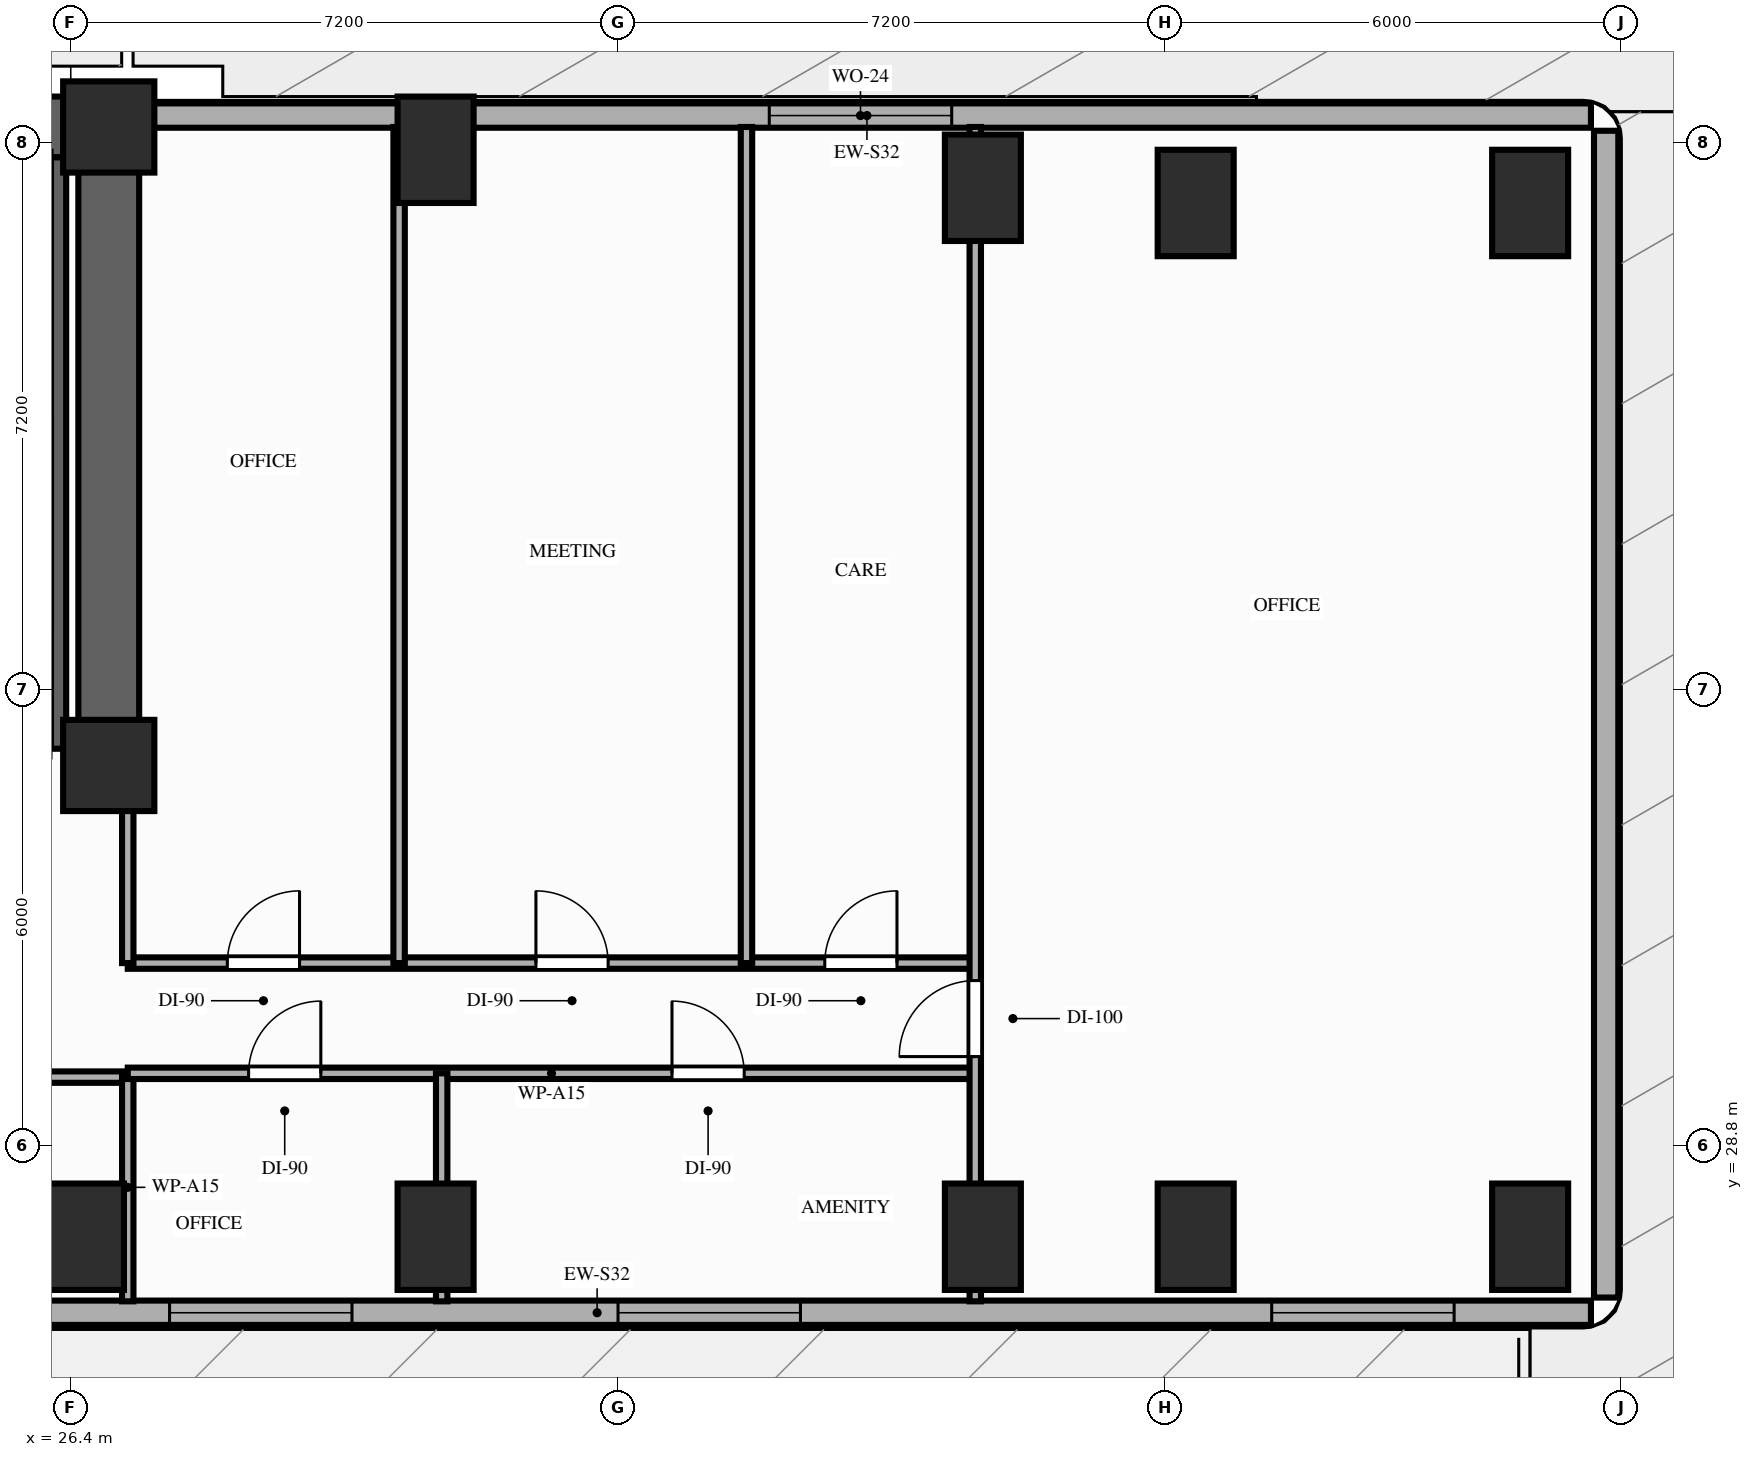
"""IFC4 building model, lengths in metres.
Left out: names, types, materials, properties, quantities, classifications, styles, units other than length and angle.
Written with IfcOpenShell. Run it as: python <this file> out.ifc"""

import sys

from ifc_helpers import new_model, si_unit, direction, frame, frame_2d, origin, origin_2d, place, context, subcontext, project, spatial, rectangle, extrude, element, fill, save


model = new_model("IFC4")
c1 = context("Model", 3, precision=1e-05, world=origin(), true_north=direction((0.0, 1.0)))
c2 = subcontext(c1, "Body", "Model", "MODEL_VIEW")
j1 = project(units=[si_unit("LENGTHUNIT", "METRE"), si_unit("PLANEANGLEUNIT", "RADIAN")], contexts=[c1])
p1 = place(None, origin())
s1 = spatial("IfcSite", under=j1, at=p1, CompositionType="ELEMENT")
p2 = place(p1, origin())
s2 = spatial("IfcBuilding", under=s1, at=p2, CompositionType="ELEMENT")
p3 = place(p2, frame((0.0, 0.0, 26.4)))
s3 = spatial("IfcBuildingStorey", under=s2, at=p3, CompositionType="ELEMENT", Elevation=26.4)
for number, where, z_axis, x_axis in (
    (1, (26.9, 33.8, 0.0), (0.0, 0.0, 1.0), (1.0, 0.0, 0.0)),
    (2, (26.9, 42.2, 0.0), (0.0, 0.0, 1.0), (1.0, 0.0, 0.0)),
):
    element("IfcColumn", number, at=place(p3, frame(where, z_axis=z_axis, x_axis=x_axis)), inside=s3, PredefinedType="COLUMN", context=c2, shape_type="SweptSolid", body=[
        extrude(rectangle(XDim=1.2, YDim=1.2, at=origin_2d()), origin(), (0.0, 0.0, 1.0), 3.8),
    ])
for number, where, z_axis, x_axis in (
    (3, (26.6, 27.6, -0.32), (0.0, 0.0, 1.0), (1.0, 0.0, 0.0)),
    (4, (31.2, 27.6, -0.32), (0.0, 0.0, 1.0), (1.0, 0.0, 0.0)),
    (5, (31.2, 41.9, -0.32), (0.0, 0.0, 1.0), (1.0, 0.0, 0.0)),
    (6, (38.4, 27.6, -0.32), (0.0, 0.0, 1.0), (1.0, 0.0, 0.0)),
    (7, (38.4, 41.4, -0.32), (0.0, 0.0, 1.0), (1.0, 0.0, 0.0)),
    (8, (41.2, 27.6, -0.32), (0.0, 0.0, 1.0), (1.0, 0.0, 0.0)),
    (9, (41.2, 41.2, -0.32), (0.0, 0.0, 1.0), (1.0, 0.0, 0.0)),
):
    element("IfcColumn", number, at=place(p3, frame(where, z_axis=z_axis, x_axis=x_axis)), inside=s3, PredefinedType="COLUMN", context=c2, shape_type="SweptSolid", body=[
        extrude(rectangle(XDim=1.0, YDim=1.4, at=origin_2d()), origin(), (0.0, 0.0, 1.0), 4.12),
    ])
for number, where, z_axis, x_axis in (
    (10, (45.6, 27.6, 0.0), (0.0, 0.0, 1.0), (1.0, 0.0, 0.0)),
    (11, (45.6, 41.2, 0.0), (0.0, 0.0, 1.0), (1.0, 0.0, 0.0)),
):
    element("IfcColumn", number, at=place(p3, frame(where, z_axis=z_axis, x_axis=x_axis)), inside=s3, PredefinedType="COLUMN", context=c2, shape_type="SweptSolid", body=[
        extrude(rectangle(XDim=1.0, YDim=1.4, at=origin_2d()), origin(), (0.0, 0.0, 1.0), 3.8),
    ])
p4 = place(p3, frame((46.4, 42.35, 0.0), z_axis=(0.0, 0.0, 1.0), x_axis=(-1.0, 0.0, 0.0)))
e12 = element("IfcWall", 12, at=p4, inside=s3, PredefinedType="STANDARD", context=c2, shape_type="SweptSolid", body=[
    extrude(rectangle(XDim=19.05, YDim=0.32, at=frame_2d((9.525, 0.0))), origin(), (0.0, 0.0, 1.0), 3.62),
])
p5 = place(p4, frame((8.41, 0.0, 0.85)))
e13 = element("IfcOpeningElement", 13, at=p5, cuts=e12, PredefinedType="OPENING", context=c2, shape_type="SweptSolid", body=[
    extrude(rectangle(XDim=2.4, YDim=1.8, at=frame_2d((1.2, 0.9))), frame((0.0, 0.17, 0.0), z_axis=(0.0, -1.0, 0.0), x_axis=(1.0, 0.0, 0.0)), (0.0, 0.0, 1.0), 0.34),
])
p6 = place(p3, frame((20.25, 26.6, 0.0), z_axis=(0.0, 0.0, 1.0), x_axis=(1.0, 0.0, 0.0)))
e14 = element("IfcWall", 14, at=p6, inside=s3, PredefinedType="STANDARD", context=c2, shape_type="SweptSolid", body=[
    extrude(rectangle(XDim=26.15, YDim=0.32, at=frame_2d((13.075, 0.0))), origin(), (0.0, 0.0, 1.0), 3.62),
])
p7 = place(p6, frame((1.95, 0.0, 0.85)))
e15 = element("IfcOpeningElement", 15, at=p7, cuts=e14, PredefinedType="OPENING", context=c2, shape_type="SweptSolid", body=[
    extrude(rectangle(XDim=2.4, YDim=1.8, at=frame_2d((1.2, 0.9))), frame((0.0, 0.17, 0.0), z_axis=(0.0, -1.0, 0.0), x_axis=(1.0, 0.0, 0.0)), (0.0, 0.0, 1.0), 0.34),
])
p8 = place(p6, frame((7.45, 0.0, 0.85)))
e16 = element("IfcOpeningElement", 16, at=p8, cuts=e14, PredefinedType="OPENING", context=c2, shape_type="SweptSolid", body=[
    extrude(rectangle(XDim=2.4, YDim=1.8, at=frame_2d((1.2, 0.9))), frame((0.0, 0.17, 0.0), z_axis=(0.0, -1.0, 0.0), x_axis=(1.0, 0.0, 0.0)), (0.0, 0.0, 1.0), 0.34),
])
p9 = place(p6, frame((13.35, 0.0, 0.85)))
e17 = element("IfcOpeningElement", 17, at=p9, cuts=e14, PredefinedType="OPENING", context=c2, shape_type="SweptSolid", body=[
    extrude(rectangle(XDim=2.4, YDim=1.8, at=frame_2d((1.2, 0.9))), frame((0.0, 0.17, 0.0), z_axis=(0.0, -1.0, 0.0), x_axis=(1.0, 0.0, 0.0)), (0.0, 0.0, 1.0), 0.34),
])
p10 = place(p6, frame((21.95, 0.0, 0.85)))
e18 = element("IfcOpeningElement", 18, at=p10, cuts=e14, PredefinedType="OPENING", context=c2, shape_type="SweptSolid", body=[
    extrude(rectangle(XDim=2.4, YDim=1.8, at=frame_2d((1.2, 0.9))), frame((0.0, 0.17, 0.0), z_axis=(0.0, -1.0, 0.0), x_axis=(1.0, 0.0, 0.0)), (0.0, 0.0, 1.0), 0.34),
])
p11 = place(p3, frame((46.6, 26.8, 0.0), z_axis=(0.0, 0.0, 1.0), x_axis=(0.0, 1.0, 0.0)))
e19 = element("IfcWall", 19, at=p11, inside=s3, PredefinedType="STANDARD", context=c2, shape_type="SweptSolid", body=[
    extrude(rectangle(XDim=15.35, YDim=0.32, at=frame_2d((7.675, 0.0))), origin(), (0.0, 0.0, 1.0), 3.62),
])
p12 = place(p3, frame((6.45, 42.2, 0.0), z_axis=(0.0, 0.0, 1.0), x_axis=(1.0, 0.0, 0.0)))
e20 = element("IfcWall", 20, at=p12, inside=s3, PredefinedType="SHEAR", context=c2, shape_type="SweptSolid", body=[
    extrude(rectangle(XDim=20.45, YDim=0.8, at=frame_2d((10.225, 0.0))), origin(), (0.0, 0.0, 1.0), 3.62),
])
p13 = place(p3, frame((26.9, 33.8, 0.0), z_axis=(0.0, 0.0, 1.0), x_axis=(0.0, 1.0, 0.0)))
e21 = element("IfcWall", 21, at=p13, inside=s3, PredefinedType="SHEAR", context=c2, shape_type="SweptSolid", body=[
    extrude(rectangle(XDim=7.95, YDim=0.8, at=frame_2d((3.975, 0.0))), origin(), (0.0, 0.0, 1.0), 3.62),
])
p14 = place(p3, frame((26.24, 34.02, 0.0), z_axis=(0.0, 0.0, 1.0), x_axis=(0.0, 1.0, 0.0)))
e22 = element("IfcWall", 22, at=p14, inside=s3, PredefinedType="SHEAR", context=c2, shape_type="SweptSolid", body=[
    extrude(rectangle(XDim=7.78, YDim=0.2, at=frame_2d((3.89, 0.0))), origin(), (0.0, 0.0, 1.0), 3.62),
])
p15 = place(p3, frame((20.45, 29.7, 0.0), z_axis=(0.0, 0.0, 1.0), x_axis=(1.0, 0.0, 0.0)))
e23 = element("IfcWall", 23, at=p15, inside=s3, PredefinedType="PARTITIONING", context=c2, shape_type="SweptSolid", body=[
    extrude(rectangle(XDim=6.7, YDim=0.15, at=frame_2d((3.35, 0.0))), origin(), (0.0, 0.0, 1.0), 3.0),
])
p16 = place(p15, frame((2.8, 0.0, 0.0)))
e24 = element("IfcOpeningElement", 24, at=p16, cuts=e23, PredefinedType="OPENING", context=c2, shape_type="SweptSolid", body=[
    extrude(rectangle(XDim=0.95, YDim=2.15, at=frame_2d((0.475, 1.075))), frame((0.0, 0.085, 0.0), z_axis=(0.0, -1.0, 0.0), x_axis=(1.0, 0.0, 0.0)), (0.0, 0.0, 1.0), 0.17),
])
p17 = place(p3, frame((27.15, 26.75, 0.0), z_axis=(0.0, 0.0, 1.0), x_axis=(0.0, 1.0, 0.0)))
e25 = element("IfcWall", 25, at=p17, inside=s3, PredefinedType="PARTITIONING", context=c2, shape_type="SweptSolid", body=[
    extrude(rectangle(XDim=3.0, YDim=0.15, at=frame_2d((1.5, 0.0))), origin(), (0.0, 0.0, 1.0), 3.62),
])
p18 = place(p3, frame((27.15, 29.75, 0.0), z_axis=(0.0, 0.0, 1.0), x_axis=(1.0, 0.0, 0.0)))
e26 = element("IfcWall", 26, at=p18, inside=s3, PredefinedType="PARTITIONING", context=c2, shape_type="SweptSolid", body=[
    extrude(rectangle(XDim=11.15, YDim=0.15, at=frame_2d((5.575, 0.0))), origin(), (0.0, 0.0, 1.0), 3.62),
])
p19 = place(p18, frame((1.59, 0.0, 0.0)))
e27 = element("IfcOpeningElement", 27, at=p19, cuts=e26, PredefinedType="OPENING", context=c2, shape_type="SweptSolid", body=[
    extrude(rectangle(XDim=0.95, YDim=2.15, at=frame_2d((0.475, 1.075))), frame((0.0, 0.085, 0.0), z_axis=(0.0, -1.0, 0.0), x_axis=(1.0, 0.0, 0.0)), (0.0, 0.0, 1.0), 0.17),
])
p20 = place(p18, frame((7.16, 0.0, 0.0)))
e28 = element("IfcOpeningElement", 28, at=p20, cuts=e26, PredefinedType="OPENING", context=c2, shape_type="SweptSolid", body=[
    extrude(rectangle(XDim=0.95, YDim=2.15, at=frame_2d((0.475, 1.075))), frame((0.0, 0.085, 0.0), z_axis=(0.0, -1.0, 0.0), x_axis=(1.0, 0.0, 0.0)), (0.0, 0.0, 1.0), 0.17),
])
p21 = place(p3, frame((27.15, 31.2, 0.0), z_axis=(0.0, 0.0, 1.0), x_axis=(1.0, 0.0, 0.0)))
e29 = element("IfcWall", 29, at=p21, inside=s3, PredefinedType="PARTITIONING", context=c2, shape_type="SweptSolid", body=[
    extrude(rectangle(XDim=11.15, YDim=0.15, at=frame_2d((5.575, 0.0))), origin(), (0.0, 0.0, 1.0), 3.0),
])
p22 = place(p21, frame((1.31, 0.0, 0.0)))
e30 = element("IfcOpeningElement", 30, at=p22, cuts=e29, PredefinedType="OPENING", context=c2, shape_type="SweptSolid", body=[
    extrude(rectangle(XDim=0.95, YDim=2.15, at=frame_2d((0.475, 1.075))), frame((0.0, 0.085, 0.0), z_axis=(0.0, -1.0, 0.0), x_axis=(1.0, 0.0, 0.0)), (0.0, 0.0, 1.0), 0.17),
])
p23 = place(p21, frame((5.37, 0.0, 0.0)))
e31 = element("IfcOpeningElement", 31, at=p23, cuts=e29, PredefinedType="OPENING", context=c2, shape_type="SweptSolid", body=[
    extrude(rectangle(XDim=0.95, YDim=2.15, at=frame_2d((0.475, 1.075))), frame((0.0, 0.085, 0.0), z_axis=(0.0, -1.0, 0.0), x_axis=(1.0, 0.0, 0.0)), (0.0, 0.0, 1.0), 0.17),
])
p24 = place(p21, frame((9.17, 0.0, 0.0)))
e32 = element("IfcOpeningElement", 32, at=p24, cuts=e29, PredefinedType="OPENING", context=c2, shape_type="SweptSolid", body=[
    extrude(rectangle(XDim=0.95, YDim=2.15, at=frame_2d((0.475, 1.075))), frame((0.0, 0.085, 0.0), z_axis=(0.0, -1.0, 0.0), x_axis=(1.0, 0.0, 0.0)), (0.0, 0.0, 1.0), 0.17),
])
p25 = place(p3, frame((27.15, 31.2, 0.0), z_axis=(0.0, 0.0, 1.0), x_axis=(0.0, 1.0, 0.0)))
e33 = element("IfcWall", 33, at=p25, inside=s3, PredefinedType="PARTITIONING", context=c2, shape_type="SweptSolid", body=[
    extrude(rectangle(XDim=2.48, YDim=0.15, at=frame_2d((1.24, 0.0))), origin(), (0.0, 0.0, 1.0), 3.0),
])
p26 = place(p3, frame((38.3, 26.75, 0.0), z_axis=(0.0, 0.0, 1.0), x_axis=(0.0, 1.0, 0.0)))
e34 = element("IfcWall", 34, at=p26, inside=s3, PredefinedType="PARTITIONING", context=c2, shape_type="SweptSolid", body=[
    extrude(rectangle(XDim=15.45, YDim=0.15, at=frame_2d((7.725, 0.0))), origin(), (0.0, 0.0, 1.0), 3.62),
])
p27 = place(p26, frame((3.22, 0.0, 0.0)))
e35 = element("IfcOpeningElement", 35, at=p27, cuts=e34, PredefinedType="OPENING", context=c2, shape_type="SweptSolid", body=[
    extrude(rectangle(XDim=1.0, YDim=2.15, at=frame_2d((0.5, 1.075))), frame((0.0, 0.085, 0.0), z_axis=(0.0, -1.0, 0.0), x_axis=(1.0, 0.0, 0.0)), (0.0, 0.0, 1.0), 0.17),
])
p28 = place(p3, frame((31.28, 26.75, 0.0), z_axis=(0.0, 0.0, 1.0), x_axis=(0.0, 1.0, 0.0)))
e36 = element("IfcWall", 36, at=p28, inside=s3, PredefinedType="PARTITIONING", context=c2, shape_type="SweptSolid", body=[
    extrude(rectangle(XDim=3.0, YDim=0.15, at=frame_2d((1.5, 0.0))), origin(), (0.0, 0.0, 1.0), 3.62),
])
for number, where, z_axis, x_axis in (
    (37, (30.72, 31.2, 0.0), (0.0, 0.0, 1.0), (0.0, 1.0, 0.0)),
    (38, (35.29, 31.2, 0.0), (0.0, 0.0, 1.0), (0.0, 1.0, 0.0)),
):
    element("IfcWall", number, at=place(p3, frame(where, z_axis=z_axis, x_axis=x_axis)), inside=s3, PredefinedType="PARTITIONING", context=c2, shape_type="SweptSolid", body=[
        extrude(rectangle(XDim=11.0, YDim=0.15, at=frame_2d((5.5, 0.0))), origin(), (0.0, 0.0, 1.0), 3.62),
    ])
p29 = place(p5, origin())
e39 = element("IfcWindow", 39, at=p29, inside=s3, PartitioningType="SINGLE_PANEL", PredefinedType="WINDOW", context=c2, shape_type="SweptSolid", body=[
    extrude(rectangle(XDim=2.4, YDim=1.8, at=frame_2d((1.2, 0.9))), frame((0.0, 0.03, 0.0), z_axis=(0.0, -1.0, 0.0), x_axis=(1.0, 0.0, 0.0)), (0.0, 0.0, 1.0), 0.06),
])
fill(e13, e39)
p30 = place(p8, origin())
e40 = element("IfcWindow", 40, at=p30, inside=s3, PartitioningType="SINGLE_PANEL", PredefinedType="WINDOW", context=c2, shape_type="SweptSolid", body=[
    extrude(rectangle(XDim=2.4, YDim=1.8, at=frame_2d((1.2, 0.9))), frame((0.0, 0.03, 0.0), z_axis=(0.0, -1.0, 0.0), x_axis=(1.0, 0.0, 0.0)), (0.0, 0.0, 1.0), 0.06),
])
fill(e16, e40)
p31 = place(p9, origin())
e41 = element("IfcWindow", 41, at=p31, inside=s3, PartitioningType="SINGLE_PANEL", PredefinedType="WINDOW", context=c2, shape_type="SweptSolid", body=[
    extrude(rectangle(XDim=2.4, YDim=1.8, at=frame_2d((1.2, 0.9))), frame((0.0, 0.03, 0.0), z_axis=(0.0, -1.0, 0.0), x_axis=(1.0, 0.0, 0.0)), (0.0, 0.0, 1.0), 0.06),
])
fill(e17, e41)
p32 = place(p10, origin())
e42 = element("IfcWindow", 42, at=p32, inside=s3, PartitioningType="SINGLE_PANEL", PredefinedType="WINDOW", context=c2, shape_type="SweptSolid", body=[
    extrude(rectangle(XDim=2.4, YDim=1.8, at=frame_2d((1.2, 0.9))), frame((0.0, 0.03, 0.0), z_axis=(0.0, -1.0, 0.0), x_axis=(1.0, 0.0, 0.0)), (0.0, 0.0, 1.0), 0.06),
])
fill(e18, e42)
p33 = place(p27, origin())
e43 = element("IfcDoor", 43, at=p33, inside=s3, OperationType="SINGLE_SWING_LEFT", PredefinedType="DOOR", context=c2, shape_type="SweptSolid", body=[
    extrude(rectangle(XDim=1.0, YDim=2.15, at=frame_2d((0.5, 1.075))), frame((0.0, 0.025, 0.0), z_axis=(0.0, -1.0, 0.0), x_axis=(1.0, 0.0, 0.0)), (0.0, 0.0, 1.0), 0.05),
])
fill(e35, e43)
p34 = place(p19, origin())
e44 = element("IfcDoor", 44, at=p34, inside=s3, OperationType="SINGLE_SWING_RIGHT", PredefinedType="DOOR", context=c2, shape_type="SweptSolid", body=[
    extrude(rectangle(XDim=0.95, YDim=2.15, at=frame_2d((0.475, 1.075))), frame((0.0, 0.025, 0.0), z_axis=(0.0, -1.0, 0.0), x_axis=(1.0, 0.0, 0.0)), (0.0, 0.0, 1.0), 0.05),
])
fill(e27, e44)
p35 = place(p20, origin())
e45 = element("IfcDoor", 45, at=p35, inside=s3, OperationType="SINGLE_SWING_LEFT", PredefinedType="DOOR", context=c2, shape_type="SweptSolid", body=[
    extrude(rectangle(XDim=0.95, YDim=2.15, at=frame_2d((0.475, 1.075))), frame((0.0, 0.025, 0.0), z_axis=(0.0, -1.0, 0.0), x_axis=(1.0, 0.0, 0.0)), (0.0, 0.0, 1.0), 0.05),
])
fill(e28, e45)
p36 = place(p22, origin())
e46 = element("IfcDoor", 46, at=p36, inside=s3, OperationType="SINGLE_SWING_RIGHT", PredefinedType="DOOR", context=c2, shape_type="SweptSolid", body=[
    extrude(rectangle(XDim=0.95, YDim=2.15, at=frame_2d((0.475, 1.075))), frame((0.0, 0.025, 0.0), z_axis=(0.0, -1.0, 0.0), x_axis=(1.0, 0.0, 0.0)), (0.0, 0.0, 1.0), 0.05),
])
fill(e30, e46)
p37 = place(p23, origin())
e47 = element("IfcDoor", 47, at=p37, inside=s3, OperationType="SINGLE_SWING_LEFT", PredefinedType="DOOR", context=c2, shape_type="SweptSolid", body=[
    extrude(rectangle(XDim=0.95, YDim=2.15, at=frame_2d((0.475, 1.075))), frame((0.0, 0.025, 0.0), z_axis=(0.0, -1.0, 0.0), x_axis=(1.0, 0.0, 0.0)), (0.0, 0.0, 1.0), 0.05),
])
fill(e31, e47)
p38 = place(p24, origin())
e48 = element("IfcDoor", 48, at=p38, inside=s3, OperationType="SINGLE_SWING_RIGHT", PredefinedType="DOOR", context=c2, shape_type="SweptSolid", body=[
    extrude(rectangle(XDim=0.95, YDim=2.15, at=frame_2d((0.475, 1.075))), frame((0.0, 0.025, 0.0), z_axis=(0.0, -1.0, 0.0), x_axis=(1.0, 0.0, 0.0)), (0.0, 0.0, 1.0), 0.05),
])
fill(e32, e48)
save(model, sys.argv[1])
